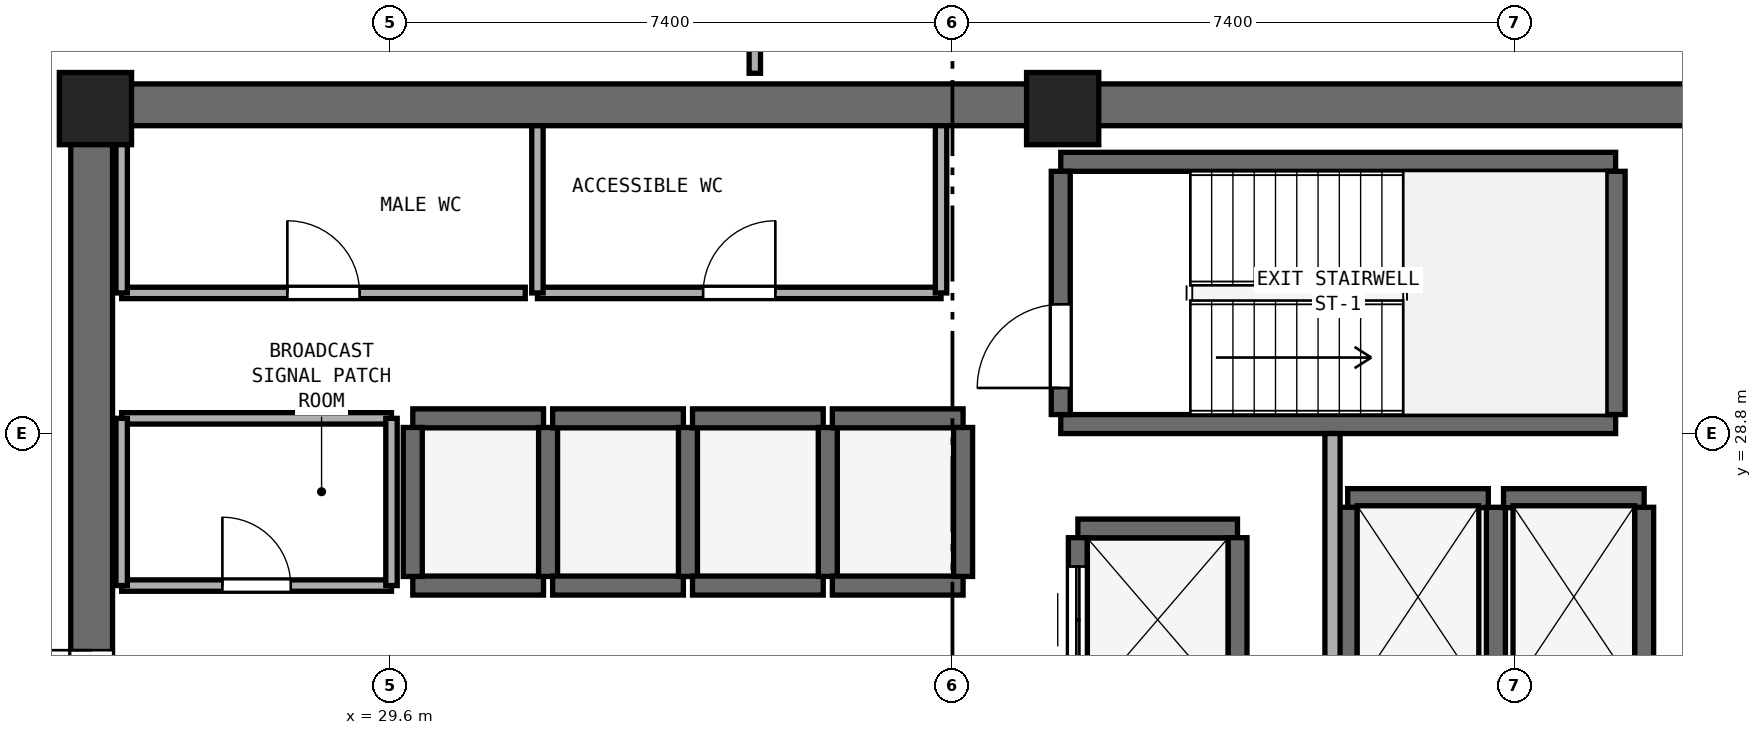
"""IFC4 building model, lengths in metres.
Left out: names, types, materials, properties, quantities, classifications, styles, units other than length and angle.
Written with IfcOpenShell. Run it as: python <this file> out.ifc"""

import sys

from ifc_helpers import new_model, si_unit, direction, frame, frame_2d, origin, origin_2d, place, context, subcontext, project, spatial, rectangle, extrude, element, fill, save


model = new_model("IFC4")
c1 = context("Model", 3, precision=1e-05, world=origin(), true_north=direction((0.0, 1.0)))
c2 = subcontext(c1, "Body", "Model", "MODEL_VIEW")
j1 = project(units=[si_unit("LENGTHUNIT", "METRE"), si_unit("PLANEANGLEUNIT", "RADIAN")], contexts=[c1])
p1 = place(None, origin())
s1 = spatial("IfcSite", under=j1, at=p1, CompositionType="ELEMENT")
p2 = place(p1, origin())
s2 = spatial("IfcBuilding", under=s1, at=p2, CompositionType="ELEMENT")
p3 = place(p2, frame((0.0, 0.0, 136.4)))
s3 = spatial("IfcBuildingStorey", under=s2, at=p3, CompositionType="ELEMENT", Elevation=136.4)
p4 = place(p3, frame((25.4, 33.125, 0.0), z_axis=(0.0, 0.0, 1.0), x_axis=(1.0, 0.0, 0.0)))
e1 = element("IfcWall", 1, at=p4, inside=s3, PredefinedType="SHEAR", context=c2, shape_type="SweptSolid", body=[
    extrude(rectangle(XDim=23.2, YDim=0.55, at=frame_2d((11.6, 0.0))), origin(), (0.0, 0.0, 1.0), 3.54),
])
p5 = place(p3, frame((25.675, 17.55, 0.0), z_axis=(0.0, 0.0, 1.0), x_axis=(0.0, 1.0, 0.0)))
e2 = element("IfcWall", 2, at=p5, inside=s3, PredefinedType="SHEAR", context=c2, shape_type="SweptSolid", body=[
    extrude(rectangle(XDim=15.3, YDim=0.55, at=frame_2d((7.65, 0.0))), origin(), (0.0, 0.0, 1.0), 3.54),
])
p6 = place(p5, frame((6.9, 0.0, 0.0)))
e3 = element("IfcOpeningElement", 3, at=p6, cuts=e2, PredefinedType="OPENING", context=c2, shape_type="SweptSolid", body=[
    extrude(rectangle(XDim=1.5, YDim=2.15, at=frame_2d((0.75, 1.075))), frame((0.0, 0.285, 0.0), z_axis=(0.0, -1.0, 0.0), x_axis=(1.0, 0.0, 0.0)), (0.0, 0.0, 1.0), 0.57),
])
for number, where, z_axis, x_axis in (
    (4, (38.45, 33.075, 0.0), (0.0, 0.0, 1.0), (1.0, 0.0, 0.0)),
    (5, (25.725, 33.075, 0.0), (0.0, 0.0, 1.0), (1.0, 0.0, 0.0)),
):
    element("IfcColumn", number, at=place(p3, frame(where, z_axis=z_axis, x_axis=x_axis)), inside=s3, PredefinedType="PILASTER", context=c2, shape_type="SweptSolid", body=[
        extrude(rectangle(XDim=0.95, YDim=0.95, at=origin_2d()), origin(), (0.0, 0.0, 1.0), 3.8),
    ])
for number, where, z_axis, x_axis in (
    (6, (38.425, 28.925, 0.0), (0.0, 0.0, 1.0), (1.0, 0.0, 0.0)),
    (7, (38.425, 32.375, 0.0), (0.0, 0.0, 1.0), (1.0, 0.0, 0.0)),
):
    element("IfcWall", number, at=place(p3, frame(where, z_axis=z_axis, x_axis=x_axis)), inside=s3, PredefinedType="SHEAR", context=c2, shape_type="SweptSolid", body=[
        extrude(rectangle(XDim=7.3, YDim=0.25, at=frame_2d((3.65, 0.0))), origin(), (0.0, 0.0, 1.0), 3.54),
    ])
p7 = place(p3, frame((38.425, 29.05, 0.0), z_axis=(0.0, 0.0, 1.0), x_axis=(0.0, 1.0, 0.0)))
e8 = element("IfcWall", 8, at=p7, inside=s3, PredefinedType="SHEAR", context=c2, shape_type="SweptSolid", body=[
    extrude(rectangle(XDim=3.2, YDim=0.25, at=frame_2d((1.6, 0.0))), origin(), (0.0, 0.0, 1.0), 3.54),
])
p8 = place(p7, frame((0.35, 0.0, 0.0)))
e9 = element("IfcOpeningElement", 9, at=p8, cuts=e8, PredefinedType="OPENING", context=c2, shape_type="SweptSolid", body=[
    extrude(rectangle(XDim=1.1, YDim=2.15, at=frame_2d((0.55, 1.075))), frame((0.0, 0.135, 0.0), z_axis=(0.0, -1.0, 0.0), x_axis=(1.0, 0.0, 0.0)), (0.0, 0.0, 1.0), 0.27),
])
p9 = place(p3, frame((45.725, 29.05, 0.0), z_axis=(0.0, 0.0, 1.0), x_axis=(0.0, 1.0, 0.0)))
e10 = element("IfcWall", 10, at=p9, inside=s3, PredefinedType="SHEAR", context=c2, shape_type="SweptSolid", body=[
    extrude(rectangle(XDim=3.2, YDim=0.25, at=frame_2d((1.6, 0.0))), origin(), (0.0, 0.0, 1.0), 3.54),
])
for number, where, z_axis, x_axis in (
    (11, (29.9, 26.8, 0.0), (0.0, 0.0, 1.0), (1.0, 0.0, 0.0)),
    (12, (29.9, 29.0, 0.0), (0.0, 0.0, 1.0), (1.0, 0.0, 0.0)),
):
    element("IfcWall", number, at=place(p3, frame(where, z_axis=z_axis, x_axis=x_axis)), inside=s3, PredefinedType="SHEAR", context=c2, shape_type="SweptSolid", body=[
        extrude(rectangle(XDim=1.72, YDim=0.25, at=frame_2d((0.86, 0.0))), origin(), (0.0, 0.0, 1.0), 3.54),
    ])
for number, where, z_axis, x_axis in (
    (13, (29.9, 26.92, 0.0), (0.0, 0.0, 1.0), (0.0, 1.0, 0.0)),
    (14, (31.68, 26.92, 0.0), (0.0, 0.0, 1.0), (0.0, 1.0, 0.0)),
):
    element("IfcWall", number, at=place(p3, frame(where, z_axis=z_axis, x_axis=x_axis)), inside=s3, PredefinedType="SHEAR", context=c2, shape_type="SweptSolid", body=[
        extrude(rectangle(XDim=1.96, YDim=0.25, at=frame_2d((0.98, 0.0))), origin(), (0.0, 0.0, 1.0), 3.54),
    ])
for number, where, z_axis, x_axis in (
    (15, (31.74, 26.8, 0.0), (0.0, 0.0, 1.0), (1.0, 0.0, 0.0)),
    (16, (31.74, 29.0, 0.0), (0.0, 0.0, 1.0), (1.0, 0.0, 0.0)),
):
    element("IfcWall", number, at=place(p3, frame(where, z_axis=z_axis, x_axis=x_axis)), inside=s3, PredefinedType="SHEAR", context=c2, shape_type="SweptSolid", body=[
        extrude(rectangle(XDim=1.72, YDim=0.25, at=frame_2d((0.86, 0.0))), origin(), (0.0, 0.0, 1.0), 3.54),
    ])
p10 = place(p3, frame((33.52, 26.92, 0.0), z_axis=(0.0, 0.0, 1.0), x_axis=(0.0, 1.0, 0.0)))
e17 = element("IfcWall", 17, at=p10, inside=s3, PredefinedType="SHEAR", context=c2, shape_type="SweptSolid", body=[
    extrude(rectangle(XDim=1.96, YDim=0.25, at=frame_2d((0.98, 0.0))), origin(), (0.0, 0.0, 1.0), 3.54),
])
for number, where, z_axis, x_axis in (
    (18, (33.58, 26.8, 0.0), (0.0, 0.0, 1.0), (1.0, 0.0, 0.0)),
    (19, (33.58, 29.0, 0.0), (0.0, 0.0, 1.0), (1.0, 0.0, 0.0)),
):
    element("IfcWall", number, at=place(p3, frame(where, z_axis=z_axis, x_axis=x_axis)), inside=s3, PredefinedType="SHEAR", context=c2, shape_type="SweptSolid", body=[
        extrude(rectangle(XDim=1.72, YDim=0.25, at=frame_2d((0.86, 0.0))), origin(), (0.0, 0.0, 1.0), 3.54),
    ])
p11 = place(p3, frame((35.36, 26.92, 0.0), z_axis=(0.0, 0.0, 1.0), x_axis=(0.0, 1.0, 0.0)))
e20 = element("IfcWall", 20, at=p11, inside=s3, PredefinedType="SHEAR", context=c2, shape_type="SweptSolid", body=[
    extrude(rectangle(XDim=1.96, YDim=0.25, at=frame_2d((0.98, 0.0))), origin(), (0.0, 0.0, 1.0), 3.54),
])
for number, where, z_axis, x_axis in (
    (21, (35.42, 26.8, 0.0), (0.0, 0.0, 1.0), (1.0, 0.0, 0.0)),
    (22, (35.42, 29.0, 0.0), (0.0, 0.0, 1.0), (1.0, 0.0, 0.0)),
):
    element("IfcWall", number, at=place(p3, frame(where, z_axis=z_axis, x_axis=x_axis)), inside=s3, PredefinedType="SHEAR", context=c2, shape_type="SweptSolid", body=[
        extrude(rectangle(XDim=1.72, YDim=0.25, at=frame_2d((0.86, 0.0))), origin(), (0.0, 0.0, 1.0), 3.54),
    ])
p12 = place(p3, frame((37.14, 26.92, 0.0), z_axis=(0.0, 0.0, 1.0), x_axis=(0.0, 1.0, 0.0)))
e23 = element("IfcWall", 23, at=p12, inside=s3, PredefinedType="SHEAR", context=c2, shape_type="SweptSolid", body=[
    extrude(rectangle(XDim=1.96, YDim=0.25, at=frame_2d((0.98, 0.0))), origin(), (0.0, 0.0, 1.0), 3.54),
])
p13 = place(p3, frame((42.2, 27.95, 0.0), z_axis=(0.0, 0.0, 1.0), x_axis=(1.0, 0.0, 0.0)))
e24 = element("IfcWall", 24, at=p13, inside=s3, PredefinedType="SHEAR", context=c2, shape_type="SweptSolid", body=[
    extrude(rectangle(XDim=1.85, YDim=0.25, at=frame_2d((0.925, 0.0))), origin(), (0.0, 0.0, 1.0), 3.54),
])
for number, where, z_axis, x_axis in (
    (25, (42.2, 25.47, 0.0), (0.0, 0.0, 1.0), (0.0, 1.0, 0.0)),
    (26, (44.15, 25.47, 0.0), (0.0, 0.0, 1.0), (0.0, 1.0, 0.0)),
):
    element("IfcWall", number, at=place(p3, frame(where, z_axis=z_axis, x_axis=x_axis)), inside=s3, PredefinedType="SHEAR", context=c2, shape_type="SweptSolid", body=[
        extrude(rectangle(XDim=2.36, YDim=0.25, at=frame_2d((1.18, 0.0))), origin(), (0.0, 0.0, 1.0), 3.54),
    ])
p14 = place(p3, frame((44.25, 27.95, 0.0), z_axis=(0.0, 0.0, 1.0), x_axis=(1.0, 0.0, 0.0)))
e27 = element("IfcWall", 27, at=p14, inside=s3, PredefinedType="SHEAR", context=c2, shape_type="SweptSolid", body=[
    extrude(rectangle(XDim=1.85, YDim=0.25, at=frame_2d((0.925, 0.0))), origin(), (0.0, 0.0, 1.0), 3.54),
])
p15 = place(p3, frame((46.1, 25.47, 0.0), z_axis=(0.0, 0.0, 1.0), x_axis=(0.0, 1.0, 0.0)))
e28 = element("IfcWall", 28, at=p15, inside=s3, PredefinedType="SHEAR", context=c2, shape_type="SweptSolid", body=[
    extrude(rectangle(XDim=2.36, YDim=0.25, at=frame_2d((1.18, 0.0))), origin(), (0.0, 0.0, 1.0), 3.54),
])
p16 = place(p3, frame((38.65, 27.55, 0.0), z_axis=(0.0, 0.0, 1.0), x_axis=(1.0, 0.0, 0.0)))
e29 = element("IfcWall", 29, at=p16, inside=s3, PredefinedType="SHEAR", context=c2, shape_type="SweptSolid", body=[
    extrude(rectangle(XDim=2.1, YDim=0.25, at=frame_2d((1.05, 0.0))), origin(), (0.0, 0.0, 1.0), 3.54),
])
p17 = place(p3, frame((38.65, 25.27, 0.0), z_axis=(0.0, 0.0, 1.0), x_axis=(0.0, 1.0, 0.0)))
e30 = element("IfcWall", 30, at=p17, inside=s3, PredefinedType="SHEAR", context=c2, shape_type="SweptSolid", body=[
    extrude(rectangle(XDim=2.16, YDim=0.25, at=frame_2d((1.08, 0.0))), origin(), (0.0, 0.0, 1.0), 3.54),
])
p18 = place(p17, frame((0.38, 0.0, 0.0)))
e31 = element("IfcOpeningElement", 31, at=p18, cuts=e30, PredefinedType="OPENING", context=c2, shape_type="SweptSolid", body=[
    extrude(rectangle(XDim=1.4, YDim=2.2, at=frame_2d((0.7, 1.1))), frame((0.0, 0.135, 0.0), z_axis=(0.0, -1.0, 0.0), x_axis=(1.0, 0.0, 0.0)), (0.0, 0.0, 1.0), 0.27),
])
p19 = place(p3, frame((40.75, 25.27, 0.0), z_axis=(0.0, 0.0, 1.0), x_axis=(0.0, 1.0, 0.0)))
e32 = element("IfcWall", 32, at=p19, inside=s3, PredefinedType="SHEAR", context=c2, shape_type="SweptSolid", body=[
    extrude(rectangle(XDim=2.16, YDim=0.25, at=frame_2d((1.08, 0.0))), origin(), (0.0, 0.0, 1.0), 3.54),
])
p20 = place(p3, frame((42.0, 22.75, 0.0), z_axis=(0.0, 0.0, 1.0), x_axis=(0.0, 1.0, 0.0)))
e33 = element("IfcWall", 33, at=p20, inside=s3, PredefinedType="SOLIDWALL", context=c2, shape_type="SweptSolid", body=[
    extrude(rectangle(XDim=6.05, YDim=0.2, at=frame_2d((3.025, 0.0))), origin(), (0.0, 0.0, 1.0), 3.54),
])
p21 = place(p20, frame((0.65, 0.0, 0.0)))
e34 = element("IfcOpeningElement", 34, at=p21, cuts=e33, PredefinedType="OPENING", context=c2, shape_type="SweptSolid", body=[
    extrude(rectangle(XDim=1.2, YDim=2.15, at=frame_2d((0.6, 1.075))), frame((0.0, 0.11, 0.0), z_axis=(0.0, -1.0, 0.0), x_axis=(1.0, 0.0, 0.0)), (0.0, 0.0, 1.0), 0.22),
])
p22 = place(p3, frame((26.07, 30.65, 0.0), z_axis=(0.0, 0.0, 1.0), x_axis=(1.0, 0.0, 0.0)))
e35 = element("IfcWall", 35, at=p22, inside=s3, PredefinedType="PARTITIONING", context=c2, shape_type="SweptSolid", body=[
    extrude(rectangle(XDim=5.31, YDim=0.15, at=frame_2d((2.655, 0.0))), origin(), (0.0, 0.0, 1.0), 3.54),
])
p23 = place(p22, frame((2.18, 0.0, 0.0)))
e36 = element("IfcOpeningElement", 36, at=p23, cuts=e35, PredefinedType="OPENING", context=c2, shape_type="SweptSolid", body=[
    extrude(rectangle(XDim=0.95, YDim=2.1, at=frame_2d((0.475, 1.05))), frame((0.0, 0.085, 0.0), z_axis=(0.0, -1.0, 0.0), x_axis=(1.0, 0.0, 0.0)), (0.0, 0.0, 1.0), 0.17),
])
p24 = place(p3, frame((26.07, 30.65, 0.0), z_axis=(0.0, 0.0, 1.0), x_axis=(0.0, 1.0, 0.0)))
e37 = element("IfcWall", 37, at=p24, inside=s3, PredefinedType="PARTITIONING", context=c2, shape_type="SweptSolid", body=[
    extrude(rectangle(XDim=2.2, YDim=0.15, at=frame_2d((1.1, 0.0))), origin(), (0.0, 0.0, 1.0), 2.64),
])
p25 = place(p3, frame((31.54, 30.65, 0.0), z_axis=(0.0, 0.0, 1.0), x_axis=(1.0, 0.0, 0.0)))
e38 = element("IfcWall", 38, at=p25, inside=s3, PredefinedType="PARTITIONING", context=c2, shape_type="SweptSolid", body=[
    extrude(rectangle(XDim=5.31, YDim=0.15, at=frame_2d((2.655, 0.0))), origin(), (0.0, 0.0, 1.0), 3.54),
])
p26 = place(p25, frame((2.18, 0.0, 0.0)))
e39 = element("IfcOpeningElement", 39, at=p26, cuts=e38, PredefinedType="OPENING", context=c2, shape_type="SweptSolid", body=[
    extrude(rectangle(XDim=0.95, YDim=2.1, at=frame_2d((0.475, 1.05))), frame((0.0, 0.085, 0.0), z_axis=(0.0, -1.0, 0.0), x_axis=(1.0, 0.0, 0.0)), (0.0, 0.0, 1.0), 0.17),
])
for number, where, z_axis, x_axis in (
    (40, (31.54, 30.65, 0.0), (0.0, 0.0, 1.0), (0.0, 1.0, 0.0)),
    (41, (36.85, 30.65, 0.0), (0.0, 0.0, 1.0), (0.0, 1.0, 0.0)),
):
    element("IfcWall", number, at=place(p3, frame(where, z_axis=z_axis, x_axis=x_axis)), inside=s3, PredefinedType="PARTITIONING", context=c2, shape_type="SweptSolid", body=[
        extrude(rectangle(XDim=2.2, YDim=0.15, at=frame_2d((1.1, 0.0))), origin(), (0.0, 0.0, 1.0), 3.54),
    ])
p27 = place(p3, frame((26.07, 26.8, 0.0), z_axis=(0.0, 0.0, 1.0), x_axis=(1.0, 0.0, 0.0)))
e42 = element("IfcWall", 42, at=p27, inside=s3, PredefinedType="PARTITIONING", context=c2, shape_type="SweptSolid", body=[
    extrude(rectangle(XDim=3.55, YDim=0.15, at=frame_2d((1.775, 0.0))), origin(), (0.0, 0.0, 1.0), 3.54),
])
p28 = place(p27, frame((1.325, 0.0, 0.0)))
e43 = element("IfcOpeningElement", 43, at=p28, cuts=e42, PredefinedType="OPENING", context=c2, shape_type="SweptSolid", body=[
    extrude(rectangle(XDim=0.9, YDim=2.1, at=frame_2d((0.45, 1.05))), frame((0.0, 0.085, 0.0), z_axis=(0.0, -1.0, 0.0), x_axis=(1.0, 0.0, 0.0)), (0.0, 0.0, 1.0), 0.17),
])
p29 = place(p3, frame((26.07, 29.0, 0.0), z_axis=(0.0, 0.0, 1.0), x_axis=(1.0, 0.0, 0.0)))
e44 = element("IfcWall", 44, at=p29, inside=s3, PredefinedType="PARTITIONING", context=c2, shape_type="SweptSolid", body=[
    extrude(rectangle(XDim=3.55, YDim=0.15, at=frame_2d((1.775, 0.0))), origin(), (0.0, 0.0, 1.0), 3.54),
])
p30 = place(p3, frame((26.07, 26.8, 0.0), z_axis=(0.0, 0.0, 1.0), x_axis=(0.0, 1.0, 0.0)))
e45 = element("IfcWall", 45, at=p30, inside=s3, PredefinedType="PARTITIONING", context=c2, shape_type="SweptSolid", body=[
    extrude(rectangle(XDim=2.2, YDim=0.15, at=frame_2d((1.1, 0.0))), origin(), (0.0, 0.0, 1.0), 2.64),
])
p31 = place(p3, frame((29.62, 26.8, 0.0), z_axis=(0.0, 0.0, 1.0), x_axis=(0.0, 1.0, 0.0)))
e46 = element("IfcWall", 46, at=p31, inside=s3, PredefinedType="PARTITIONING", context=c2, shape_type="SweptSolid", body=[
    extrude(rectangle(XDim=2.2, YDim=0.15, at=frame_2d((1.1, 0.0))), origin(), (0.0, 0.0, 1.0), 3.54),
])
p32 = place(p3, frame((34.4, 33.54, 0.0), z_axis=(0.0, 0.0, 1.0), x_axis=(0.0, 1.0, 0.0)))
e47 = element("IfcWall", 47, at=p32, inside=s3, PredefinedType="PARTITIONING", context=c2, shape_type="SweptSolid", body=[
    extrude(rectangle(XDim=3.71, YDim=0.15, at=frame_2d((1.855, 0.0))), origin(), (0.0, 0.0, 1.0), 3.54),
])
p33 = place(p32, frame((1.355, 0.0, 0.0)))
e48 = element("IfcOpeningElement", 48, at=p33, cuts=e47, PredefinedType="OPENING", context=c2, shape_type="SweptSolid", body=[
    extrude(rectangle(XDim=1.0, YDim=2.12, at=frame_2d((0.5, 1.06))), frame((0.0, 0.085, 0.0), z_axis=(0.0, -1.0, 0.0), x_axis=(1.0, 0.0, 0.0)), (0.0, 0.0, 1.0), 0.17),
])
p34 = place(p8, origin())
e49 = element("IfcDoor", 49, at=p34, inside=s3, OperationType="SINGLE_SWING_LEFT", PredefinedType="DOOR", context=c2, shape_type="SweptSolid", body=[
    extrude(rectangle(XDim=1.1, YDim=2.15, at=frame_2d((0.55, 1.075))), frame((0.0, 0.025, 0.0), z_axis=(0.0, -1.0, 0.0), x_axis=(1.0, 0.0, 0.0)), (0.0, 0.0, 1.0), 0.05),
])
fill(e9, e49)
p35 = place(p18, origin())
e50 = element("IfcDoor", 50, at=p35, inside=s3, OperationType="DOUBLE_DOOR_SLIDING", PredefinedType="DOOR", context=c2, shape_type="SweptSolid", body=[
    extrude(rectangle(XDim=1.4, YDim=2.2, at=frame_2d((0.7, 1.1))), frame((0.0, 0.025, 0.0), z_axis=(0.0, -1.0, 0.0), x_axis=(1.0, 0.0, 0.0)), (0.0, 0.0, 1.0), 0.05),
])
fill(e31, e50)
p36 = place(p6, origin())
e51 = element("IfcDoor", 51, at=p36, inside=s3, OperationType="DOUBLE_DOOR_SINGLE_SWING", PredefinedType="DOOR", context=c2, shape_type="SweptSolid", body=[
    extrude(rectangle(XDim=1.5, YDim=2.15, at=frame_2d((0.75, 1.075))), frame((0.0, 0.025, 0.0), z_axis=(0.0, -1.0, 0.0), x_axis=(1.0, 0.0, 0.0)), (0.0, 0.0, 1.0), 0.05),
])
fill(e3, e51)
p37 = place(p23, origin())
e52 = element("IfcDoor", 52, at=p37, inside=s3, OperationType="SINGLE_SWING_LEFT", PredefinedType="DOOR", context=c2, shape_type="SweptSolid", body=[
    extrude(rectangle(XDim=0.95, YDim=2.1, at=frame_2d((0.475, 1.05))), frame((0.0, 0.025, 0.0), z_axis=(0.0, -1.0, 0.0), x_axis=(1.0, 0.0, 0.0)), (0.0, 0.0, 1.0), 0.05),
])
fill(e36, e52)
p38 = place(p26, origin())
e53 = element("IfcDoor", 53, at=p38, inside=s3, OperationType="SINGLE_SWING_RIGHT", PredefinedType="DOOR", context=c2, shape_type="SweptSolid", body=[
    extrude(rectangle(XDim=0.95, YDim=2.1, at=frame_2d((0.475, 1.05))), frame((0.0, 0.025, 0.0), z_axis=(0.0, -1.0, 0.0), x_axis=(1.0, 0.0, 0.0)), (0.0, 0.0, 1.0), 0.05),
])
fill(e39, e53)
p39 = place(p28, origin())
e54 = element("IfcDoor", 54, at=p39, inside=s3, OperationType="SINGLE_SWING_LEFT", PredefinedType="DOOR", context=c2, shape_type="SweptSolid", body=[
    extrude(rectangle(XDim=0.9, YDim=2.1, at=frame_2d((0.45, 1.05))), frame((0.0, 0.025, 0.0), z_axis=(0.0, -1.0, 0.0), x_axis=(1.0, 0.0, 0.0)), (0.0, 0.0, 1.0), 0.05),
])
fill(e43, e54)
save(model, sys.argv[1])
